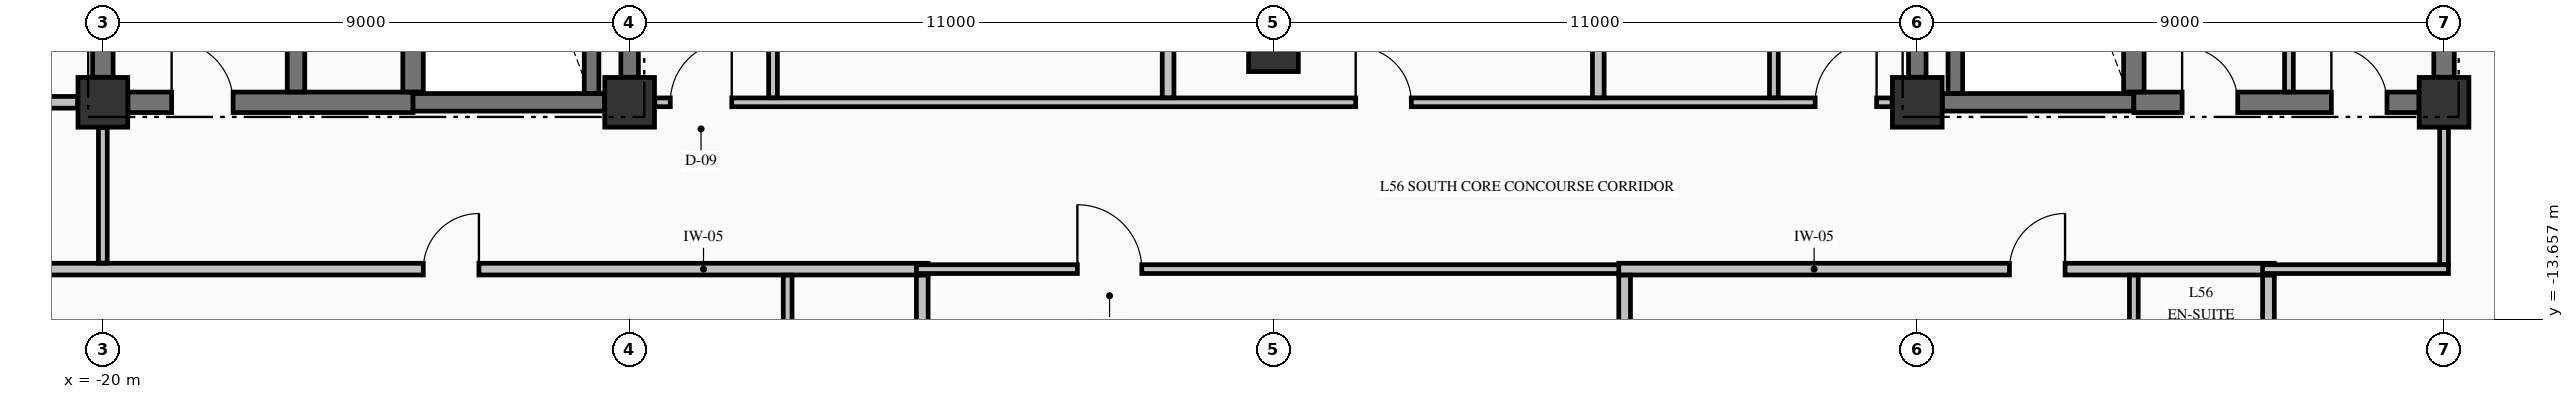
"""IFC4 building model, lengths in metres.
Left out: names, types, materials, properties, quantities, classifications, styles, units other than length and angle.
Written with IfcOpenShell. Run it as: python <this file> out.ifc"""

import sys

from ifc_helpers import new_model, si_unit, direction, frame, frame_2d, origin, origin_2d, place, context, subcontext, project, spatial, rectangle, extrude, element, fill, save


model = new_model("IFC4")
c1 = context("Model", 3, precision=1e-05, world=origin(), true_north=direction((0.0, 1.0)))
c2 = subcontext(c1, "Body", "Model", "MODEL_VIEW")
j1 = project(units=[si_unit("LENGTHUNIT", "METRE"), si_unit("PLANEANGLEUNIT", "RADIAN")], contexts=[c1])
p1 = place(None, origin())
s1 = spatial("IfcSite", under=j1, at=p1, CompositionType="ELEMENT")
p2 = place(p1, origin())
s2 = spatial("IfcBuilding", under=s1, at=p2, CompositionType="ELEMENT")
p3 = place(p2, frame((0.0, 0.0, 215.26)))
s3 = spatial("IfcBuildingStorey", under=s2, at=p3, CompositionType="ELEMENT", Elevation=215.26)
for number, where, z_axis, x_axis in (
    (1, (-20.0, -9.95, -0.25), (0.0, 0.0, 1.0), (1.0, 0.0, 0.0)),
    (2, (-11.0, -9.95, -0.25), (0.0, 0.0, 1.0), (1.0, 0.0, 0.0)),
    (3, (11.0, -9.95, -0.25), (0.0, 0.0, 1.0), (1.0, 0.0, 0.0)),
    (4, (20.0, -9.95, -0.25), (0.0, 0.0, 1.0), (1.0, 0.0, 0.0)),
    (5, (0.0, -9.0, -0.25), (0.0, 0.0, 1.0), (1.0, 0.0, 0.0)),
):
    element("IfcColumn", number, at=place(p3, frame(where, z_axis=z_axis, x_axis=x_axis)), inside=s3, PredefinedType="COLUMN", context=c2, shape_type="SweptSolid", body=[
        extrude(rectangle(XDim=0.85, YDim=0.85, at=origin_2d()), origin(), (0.0, 0.0, 1.0), 3.4),
    ])
p4 = place(p3, frame((-19.571, -9.95, 0.0), z_axis=(0.0, 0.0, 1.0), x_axis=(1.0, 0.0, 0.0)))
e6 = element("IfcWall", 6, at=p4, inside=s3, PredefinedType="SHEAR", context=c2, shape_type="SweptSolid", body=[
    extrude(rectangle(XDim=4.871, YDim=0.35, at=frame_2d((2.436, 0.0))), origin(), (0.0, 0.0, 1.0), 3.15),
])
p5 = place(p4, frame((0.746, 0.0, 0.0)))
e7 = element("IfcOpeningElement", 7, at=p5, cuts=e6, PredefinedType="OPENING", context=c2, shape_type="SweptSolid", body=[
    extrude(rectangle(XDim=1.05, YDim=2.15, at=frame_2d((0.525, 1.075))), frame((0.0, 0.185, 0.0), z_axis=(0.0, -1.0, 0.0), x_axis=(1.0, 0.0, 0.0)), (0.0, 0.0, 1.0), 0.37),
])
for number, where, z_axis, x_axis in (
    (8, (-14.7, -9.95, 0.0), (0.0, 0.0, 1.0), (1.0, 0.0, 0.0)),
    (9, (11.429, -9.95, 0.0), (0.0, 0.0, 1.0), (1.0, 0.0, 0.0)),
):
    element("IfcWall", number, at=place(p3, frame(where, z_axis=z_axis, x_axis=x_axis)), inside=s3, PredefinedType="SHEAR", context=c2, shape_type="SweptSolid", body=[
        extrude(rectangle(XDim=3.271, YDim=0.3, at=frame_2d((1.635, 0.0))), origin(), (0.0, 0.0, 1.0), 3.15),
    ])
p6 = place(p3, frame((14.7, -9.95, 0.0), z_axis=(0.0, 0.0, 1.0), x_axis=(1.0, 0.0, 0.0)))
e10 = element("IfcWall", 10, at=p6, inside=s3, PredefinedType="SHEAR", context=c2, shape_type="SweptSolid", body=[
    extrude(rectangle(XDim=4.871, YDim=0.35, at=frame_2d((2.436, 0.0))), origin(), (0.0, 0.0, 1.0), 3.15),
])
p7 = place(p6, frame((0.825, 0.0, 0.0)))
e11 = element("IfcOpeningElement", 11, at=p7, cuts=e10, PredefinedType="OPENING", context=c2, shape_type="SweptSolid", body=[
    extrude(rectangle(XDim=0.95, YDim=2.15, at=frame_2d((0.475, 1.075))), frame((0.0, 0.185, 0.0), z_axis=(0.0, -1.0, 0.0), x_axis=(1.0, 0.0, 0.0)), (0.0, 0.0, 1.0), 0.37),
])
p8 = place(p6, frame((3.375, 0.0, 0.0)))
e12 = element("IfcOpeningElement", 12, at=p8, cuts=e10, PredefinedType="OPENING", context=c2, shape_type="SweptSolid", body=[
    extrude(rectangle(XDim=0.95, YDim=2.15, at=frame_2d((0.475, 1.075))), frame((0.0, 0.185, 0.0), z_axis=(0.0, -1.0, 0.0), x_axis=(1.0, 0.0, 0.0)), (0.0, 0.0, 1.0), 0.37),
])
p9 = place(p3, frame((-22.1, -12.8, 0.0), z_axis=(0.0, 0.0, 1.0), x_axis=(1.0, 0.0, 0.0)))
e13 = element("IfcWall", 13, at=p9, inside=s3, PredefinedType="PARTITIONING", context=c2, shape_type="SweptSolid", body=[
    extrude(rectangle(XDim=16.2, YDim=0.2, at=frame_2d((8.1, 0.0))), origin(), (0.0, 0.0, 1.0), 3.15),
])
p10 = place(p9, frame((7.575, 0.0, 0.0)))
e14 = element("IfcOpeningElement", 14, at=p10, cuts=e13, PredefinedType="OPENING", context=c2, shape_type="SweptSolid", body=[
    extrude(rectangle(XDim=0.95, YDim=2.15, at=frame_2d((0.475, 1.075))), frame((0.0, 0.11, 0.0), z_axis=(0.0, -1.0, 0.0), x_axis=(1.0, 0.0, 0.0)), (0.0, 0.0, 1.0), 0.22),
])
p11 = place(p3, frame((-6.1, -12.8, 0.0), z_axis=(0.0, 0.0, 1.0), x_axis=(1.0, 0.0, 0.0)))
e15 = element("IfcWall", 15, at=p11, inside=s3, PredefinedType="PARTITIONING", context=c2, shape_type="SweptSolid", body=[
    extrude(rectangle(XDim=12.2, YDim=0.15, at=frame_2d((6.1, 0.0))), origin(), (0.0, 0.0, 1.0), 3.15),
])
p12 = place(p11, frame((2.75, 0.0, 0.0)))
e16 = element("IfcOpeningElement", 16, at=p12, cuts=e15, PredefinedType="OPENING", context=c2, shape_type="SweptSolid", body=[
    extrude(rectangle(XDim=1.1, YDim=2.15, at=frame_2d((0.55, 1.075))), frame((0.0, 0.085, 0.0), z_axis=(0.0, -1.0, 0.0), x_axis=(1.0, 0.0, 0.0)), (0.0, 0.0, 1.0), 0.17),
])
p13 = place(p3, frame((5.9, -12.8, 0.0), z_axis=(0.0, 0.0, 1.0), x_axis=(1.0, 0.0, 0.0)))
e17 = element("IfcWall", 17, at=p13, inside=s3, PredefinedType="PARTITIONING", context=c2, shape_type="SweptSolid", body=[
    extrude(rectangle(XDim=11.2, YDim=0.2, at=frame_2d((5.6, 0.0))), origin(), (0.0, 0.0, 1.0), 3.15),
])
p14 = place(p13, frame((6.675, 0.0, 0.0)))
e18 = element("IfcOpeningElement", 18, at=p14, cuts=e17, PredefinedType="OPENING", context=c2, shape_type="SweptSolid", body=[
    extrude(rectangle(XDim=0.95, YDim=2.15, at=frame_2d((0.475, 1.075))), frame((0.0, 0.11, 0.0), z_axis=(0.0, -1.0, 0.0), x_axis=(1.0, 0.0, 0.0)), (0.0, 0.0, 1.0), 0.22),
])
p15 = place(p3, frame((16.9, -12.8, 0.0), z_axis=(0.0, 0.0, 1.0), x_axis=(1.0, 0.0, 0.0)))
e19 = element("IfcWall", 19, at=p15, inside=s3, PredefinedType="PARTITIONING", context=c2, shape_type="SweptSolid", body=[
    extrude(rectangle(XDim=3.175, YDim=0.15, at=frame_2d((1.587, 0.0))), origin(), (0.0, 0.0, 1.0), 3.15),
])
p16 = place(p3, frame((-26.835, -9.95, 0.0), z_axis=(0.0, 0.0, 1.0), x_axis=(1.0, 0.0, 0.0)))
e20 = element("IfcWall", 20, at=p16, inside=s3, PredefinedType="PARTITIONING", context=c2, shape_type="SweptSolid", body=[
    extrude(rectangle(XDim=6.404, YDim=0.2, at=frame_2d((3.202, 0.0))), origin(), (0.0, 0.0, 1.0), 3.15),
])
p17 = place(p3, frame((-10.569, -9.95, 0.0), z_axis=(0.0, 0.0, 1.0), x_axis=(1.0, 0.0, 0.0)))
e21 = element("IfcWall", 21, at=p17, inside=s3, PredefinedType="PARTITIONING", context=c2, shape_type="SweptSolid", body=[
    extrude(rectangle(XDim=21.138, YDim=0.15, at=frame_2d((10.569, 0.0))), origin(), (0.0, 0.0, 1.0), 3.15),
])
p18 = place(p17, frame((0.264, 0.0, 0.0)))
e22 = element("IfcOpeningElement", 22, at=p18, cuts=e21, PredefinedType="OPENING", context=c2, shape_type="SweptSolid", body=[
    extrude(rectangle(XDim=1.05, YDim=2.15, at=frame_2d((0.525, 1.075))), frame((0.0, 0.085, 0.0), z_axis=(0.0, -1.0, 0.0), x_axis=(1.0, 0.0, 0.0)), (0.0, 0.0, 1.0), 0.17),
])
p19 = place(p17, frame((19.824, 0.0, 0.0)))
e23 = element("IfcOpeningElement", 23, at=p19, cuts=e21, PredefinedType="OPENING", context=c2, shape_type="SweptSolid", body=[
    extrude(rectangle(XDim=1.05, YDim=2.15, at=frame_2d((0.525, 1.075))), frame((0.0, 0.085, 0.0), z_axis=(0.0, -1.0, 0.0), x_axis=(1.0, 0.0, 0.0)), (0.0, 0.0, 1.0), 0.17),
])
p20 = place(p17, frame((11.974, 0.0, 0.0)))
e24 = element("IfcOpeningElement", 24, at=p20, cuts=e21, PredefinedType="OPENING", context=c2, shape_type="SweptSolid", body=[
    extrude(rectangle(XDim=0.95, YDim=2.15, at=frame_2d((0.475, 1.075))), frame((0.0, 0.085, 0.0), z_axis=(0.0, -1.0, 0.0), x_axis=(1.0, 0.0, 0.0)), (0.0, 0.0, 1.0), 0.17),
])
p21 = place(p3, frame((-20.0, -9.521, 0.0), z_axis=(0.0, 0.0, 1.0), x_axis=(0.0, 1.0, 0.0)))
e25 = element("IfcWall", 25, at=p21, inside=s3, PredefinedType="SHEAR", context=c2, shape_type="SweptSolid", body=[
    extrude(rectangle(XDim=9.092, YDim=0.35, at=frame_2d((4.546, 0.0))), origin(), (0.0, 0.0, 1.0), 3.15),
])
p22 = place(p3, frame((-16.7, -9.773, 0.0), z_axis=(0.0, 0.0, 1.0), x_axis=(0.0, 1.0, 0.0)))
e26 = element("IfcWall", 26, at=p22, inside=s3, PredefinedType="SHEAR", context=c2, shape_type="SweptSolid", body=[
    extrude(rectangle(XDim=9.371, YDim=0.3, at=frame_2d((4.686, 0.0))), origin(), (0.0, 0.0, 1.0), 3.15),
])
p23 = place(p3, frame((-14.7, -9.773, 0.0), z_axis=(0.0, 0.0, 1.0), x_axis=(0.0, 1.0, 0.0)))
e27 = element("IfcWall", 27, at=p23, inside=s3, PredefinedType="SHEAR", context=c2, shape_type="SweptSolid", body=[
    extrude(rectangle(XDim=9.371, YDim=0.35, at=frame_2d((4.686, 0.0))), origin(), (0.0, 0.0, 1.0), 3.15),
])
p24 = place(p3, frame((-11.65, -9.798, 0.0), z_axis=(0.0, 0.0, 1.0), x_axis=(0.0, 1.0, 0.0)))
e28 = element("IfcWall", 28, at=p24, inside=s3, PredefinedType="SOLIDWALL", context=c2, shape_type="SweptSolid", body=[
    extrude(rectangle(XDim=9.396, YDim=0.25, at=frame_2d((4.698, 0.0))), origin(), (0.0, 0.0, 1.0), 3.15),
])
for number, where, z_axis, x_axis in (
    (29, (-11.0, -9.521, 0.0), (0.0, 0.0, 1.0), (0.0, 1.0, 0.0)),
    (30, (11.0, -9.521, 0.0), (0.0, 0.0, 1.0), (0.0, 1.0, 0.0)),
):
    element("IfcWall", number, at=place(p3, frame(where, z_axis=z_axis, x_axis=x_axis)), inside=s3, PredefinedType="SHEAR", context=c2, shape_type="SweptSolid", body=[
        extrude(rectangle(XDim=9.092, YDim=0.3, at=frame_2d((4.546, 0.0))), origin(), (0.0, 0.0, 1.0), 3.15),
    ])
p25 = place(p3, frame((11.65, -9.798, 0.0), z_axis=(0.0, 0.0, 1.0), x_axis=(0.0, 1.0, 0.0)))
e31 = element("IfcWall", 31, at=p25, inside=s3, PredefinedType="SOLIDWALL", context=c2, shape_type="SweptSolid", body=[
    extrude(rectangle(XDim=9.396, YDim=0.25, at=frame_2d((4.698, 0.0))), origin(), (0.0, 0.0, 1.0), 3.15),
])
p26 = place(p3, frame((14.7, -9.773, 0.0), z_axis=(0.0, 0.0, 1.0), x_axis=(0.0, 1.0, 0.0)))
e32 = element("IfcWall", 32, at=p26, inside=s3, PredefinedType="SHEAR", context=c2, shape_type="SweptSolid", body=[
    extrude(rectangle(XDim=9.371, YDim=0.35, at=frame_2d((4.686, 0.0))), origin(), (0.0, 0.0, 1.0), 3.15),
])
p27 = place(p3, frame((20.0, -9.521, 0.0), z_axis=(0.0, 0.0, 1.0), x_axis=(0.0, 1.0, 0.0)))
e33 = element("IfcWall", 33, at=p27, inside=s3, PredefinedType="SHEAR", context=c2, shape_type="SweptSolid", body=[
    extrude(rectangle(XDim=9.092, YDim=0.35, at=frame_2d((4.546, 0.0))), origin(), (0.0, 0.0, 1.0), 3.15),
])
p28 = place(p3, frame((-20.0, -12.697, 0.0), z_axis=(0.0, 0.0, 1.0), x_axis=(0.0, 1.0, 0.0)))
e34 = element("IfcWall", 34, at=p28, inside=s3, PredefinedType="PARTITIONING", context=c2, shape_type="SweptSolid", body=[
    extrude(rectangle(XDim=2.316, YDim=0.15, at=frame_2d((1.158, 0.0))), origin(), (0.0, 0.0, 1.0), 2.342),
])
p29 = place(p3, frame((-8.55, -9.872, 0.0), z_axis=(0.0, 0.0, 1.0), x_axis=(0.0, 1.0, 0.0)))
e35 = element("IfcWall", 35, at=p29, inside=s3, PredefinedType="PARTITIONING", context=c2, shape_type="SweptSolid", body=[
    extrude(rectangle(XDim=10.569, YDim=0.15, at=frame_2d((5.285, 0.0))), origin(), (0.0, 0.0, 1.0), 3.15),
])
p30 = place(p29, frame((4.802, 0.0, 0.0)))
e36 = element("IfcOpeningElement", 36, at=p30, cuts=e35, PredefinedType="OPENING", context=c2, shape_type="SweptSolid", body=[
    extrude(rectangle(XDim=1.0, YDim=2.15, at=frame_2d((0.5, 1.075))), frame((0.0, 0.085, 0.0), z_axis=(0.0, -1.0, 0.0), x_axis=(1.0, 0.0, 0.0)), (0.0, 0.0, 1.0), 0.17),
])
p31 = place(p3, frame((-8.3, -14.972, 0.0), z_axis=(0.0, 0.0, 1.0), x_axis=(0.0, 1.0, 0.0)))
e37 = element("IfcWall", 37, at=p31, inside=s3, PredefinedType="PARTITIONING", context=c2, shape_type="SweptSolid", body=[
    extrude(rectangle(XDim=2.069, YDim=0.15, at=frame_2d((1.034, 0.0))), origin(), (0.0, 0.0, 1.0), 3.15),
])
p32 = place(p3, frame((-6.0, -14.972, 0.0), z_axis=(0.0, 0.0, 1.0), x_axis=(0.0, 1.0, 0.0)))
e38 = element("IfcWall", 38, at=p32, inside=s3, PredefinedType="PARTITIONING", context=c2, shape_type="SweptSolid", body=[
    extrude(rectangle(XDim=2.069, YDim=0.2, at=frame_2d((1.034, 0.0))), origin(), (0.0, 0.0, 1.0), 3.15),
])
for number, where, z_axis, x_axis in (
    (39, (-1.8, -9.872, 0.0), (0.0, 0.0, 1.0), (0.0, 1.0, 0.0)),
    (40, (5.55, -9.872, 0.0), (0.0, 0.0, 1.0), (0.0, 1.0, 0.0)),
):
    element("IfcWall", number, at=place(p3, frame(where, z_axis=z_axis, x_axis=x_axis)), inside=s3, PredefinedType="PARTITIONING", context=c2, shape_type="SweptSolid", body=[
        extrude(rectangle(XDim=4.569, YDim=0.2, at=frame_2d((2.285, 0.0))), origin(), (0.0, 0.0, 1.0), 3.15),
    ])
p33 = place(p3, frame((6.0, -16.472, 0.0), z_axis=(0.0, 0.0, 1.0), x_axis=(0.0, 1.0, 0.0)))
e41 = element("IfcWall", 41, at=p33, inside=s3, PredefinedType="PARTITIONING", context=c2, shape_type="SweptSolid", body=[
    extrude(rectangle(XDim=3.569, YDim=0.2, at=frame_2d((1.784, 0.0))), origin(), (0.0, 0.0, 1.0), 3.15),
])
p34 = place(p3, frame((8.55, -9.872, 0.0), z_axis=(0.0, 0.0, 1.0), x_axis=(0.0, 1.0, 0.0)))
e42 = element("IfcWall", 42, at=p34, inside=s3, PredefinedType="PARTITIONING", context=c2, shape_type="SweptSolid", body=[
    extrude(rectangle(XDim=4.569, YDim=0.15, at=frame_2d((2.285, 0.0))), origin(), (0.0, 0.0, 1.0), 3.15),
])
p35 = place(p34, frame((1.847, 0.0, 0.0)))
e43 = element("IfcOpeningElement", 43, at=p35, cuts=e42, PredefinedType="OPENING", context=c2, shape_type="SweptSolid", body=[
    extrude(rectangle(XDim=0.95, YDim=2.15, at=frame_2d((0.475, 1.075))), frame((0.0, 0.085, 0.0), z_axis=(0.0, -1.0, 0.0), x_axis=(1.0, 0.0, 0.0)), (0.0, 0.0, 1.0), 0.17),
])
p36 = place(p3, frame((14.7, -15.672, 0.0), z_axis=(0.0, 0.0, 1.0), x_axis=(0.0, 1.0, 0.0)))
e44 = element("IfcWall", 44, at=p36, inside=s3, PredefinedType="PARTITIONING", context=c2, shape_type="SweptSolid", body=[
    extrude(rectangle(XDim=2.769, YDim=0.15, at=frame_2d((1.385, 0.0))), origin(), (0.0, 0.0, 1.0), 3.15),
])
p37 = place(p3, frame((17.0, -15.672, 0.0), z_axis=(0.0, 0.0, 1.0), x_axis=(0.0, 1.0, 0.0)))
e45 = element("IfcWall", 45, at=p37, inside=s3, PredefinedType="PARTITIONING", context=c2, shape_type="SweptSolid", body=[
    extrude(rectangle(XDim=2.769, YDim=0.2, at=frame_2d((1.385, 0.0))), origin(), (0.0, 0.0, 1.0), 3.15),
])
p38 = place(p3, frame((17.35, -9.772, 0.0), z_axis=(0.0, 0.0, 1.0), x_axis=(0.0, 1.0, 0.0)))
e46 = element("IfcWall", 46, at=p38, inside=s3, PredefinedType="PARTITIONING", context=c2, shape_type="SweptSolid", body=[
    extrude(rectangle(XDim=7.194, YDim=0.15, at=frame_2d((3.597, 0.0))), origin(), (0.0, 0.0, 1.0), 3.15),
])
p39 = place(p3, frame((20.0, -12.722, 0.0), z_axis=(0.0, 0.0, 1.0), x_axis=(0.0, 1.0, 0.0)))
e47 = element("IfcWall", 47, at=p39, inside=s3, PredefinedType="PARTITIONING", context=c2, shape_type="SweptSolid", body=[
    extrude(rectangle(XDim=2.341, YDim=0.15, at=frame_2d((1.17, 0.0))), origin(), (0.0, 0.0, 1.0), 2.342),
])
p40 = place(p5, origin())
e48 = element("IfcDoor", 48, at=p40, inside=s3, OperationType="SINGLE_SWING_LEFT", PredefinedType="DOOR", context=c2, shape_type="SweptSolid", body=[
    extrude(rectangle(XDim=1.05, YDim=2.15, at=frame_2d((0.525, 1.075))), frame((0.0, 0.025, 0.0), z_axis=(0.0, -1.0, 0.0), x_axis=(1.0, 0.0, 0.0)), (0.0, 0.0, 1.0), 0.05),
])
fill(e7, e48)
p41 = place(p7, origin())
e49 = element("IfcDoor", 49, at=p41, inside=s3, OperationType="SINGLE_SWING_LEFT", PredefinedType="DOOR", context=c2, shape_type="SweptSolid", body=[
    extrude(rectangle(XDim=0.95, YDim=2.15, at=frame_2d((0.475, 1.075))), frame((0.0, 0.025, 0.0), z_axis=(0.0, -1.0, 0.0), x_axis=(1.0, 0.0, 0.0)), (0.0, 0.0, 1.0), 0.05),
])
fill(e11, e49)
p42 = place(p8, origin())
e50 = element("IfcDoor", 50, at=p42, inside=s3, OperationType="SINGLE_SWING_LEFT", PredefinedType="DOOR", context=c2, shape_type="SweptSolid", body=[
    extrude(rectangle(XDim=0.95, YDim=2.15, at=frame_2d((0.475, 1.075))), frame((0.0, 0.025, 0.0), z_axis=(0.0, -1.0, 0.0), x_axis=(1.0, 0.0, 0.0)), (0.0, 0.0, 1.0), 0.05),
])
fill(e12, e50)
p43 = place(p18, origin())
e51 = element("IfcDoor", 51, at=p43, inside=s3, OperationType="SINGLE_SWING_RIGHT", PredefinedType="DOOR", context=c2, shape_type="SweptSolid", body=[
    extrude(rectangle(XDim=1.05, YDim=2.15, at=frame_2d((0.525, 1.075))), frame((0.0, 0.025, 0.0), z_axis=(0.0, -1.0, 0.0), x_axis=(1.0, 0.0, 0.0)), (0.0, 0.0, 1.0), 0.05),
])
fill(e22, e51)
p44 = place(p19, origin())
e52 = element("IfcDoor", 52, at=p44, inside=s3, OperationType="SINGLE_SWING_RIGHT", PredefinedType="DOOR", context=c2, shape_type="SweptSolid", body=[
    extrude(rectangle(XDim=1.05, YDim=2.15, at=frame_2d((0.525, 1.075))), frame((0.0, 0.025, 0.0), z_axis=(0.0, -1.0, 0.0), x_axis=(1.0, 0.0, 0.0)), (0.0, 0.0, 1.0), 0.05),
])
fill(e23, e52)
p45 = place(p12, origin())
e53 = element("IfcDoor", 53, at=p45, inside=s3, OperationType="SINGLE_SWING_LEFT", PredefinedType="DOOR", context=c2, shape_type="SweptSolid", body=[
    extrude(rectangle(XDim=1.1, YDim=2.15, at=frame_2d((0.55, 1.075))), frame((0.0, 0.025, 0.0), z_axis=(0.0, -1.0, 0.0), x_axis=(1.0, 0.0, 0.0)), (0.0, 0.0, 1.0), 0.05),
])
fill(e16, e53)
p46 = place(p10, origin())
e54 = element("IfcDoor", 54, at=p46, inside=s3, OperationType="SINGLE_SWING_RIGHT", PredefinedType="DOOR", context=c2, shape_type="SweptSolid", body=[
    extrude(rectangle(XDim=0.95, YDim=2.15, at=frame_2d((0.475, 1.075))), frame((0.0, 0.025, 0.0), z_axis=(0.0, -1.0, 0.0), x_axis=(1.0, 0.0, 0.0)), (0.0, 0.0, 1.0), 0.05),
])
fill(e14, e54)
p47 = place(p14, origin())
e55 = element("IfcDoor", 55, at=p47, inside=s3, OperationType="SINGLE_SWING_RIGHT", PredefinedType="DOOR", context=c2, shape_type="SweptSolid", body=[
    extrude(rectangle(XDim=0.95, YDim=2.15, at=frame_2d((0.475, 1.075))), frame((0.0, 0.025, 0.0), z_axis=(0.0, -1.0, 0.0), x_axis=(1.0, 0.0, 0.0)), (0.0, 0.0, 1.0), 0.05),
])
fill(e18, e55)
p48 = place(p20, origin())
e56 = element("IfcDoor", 56, at=p48, inside=s3, OperationType="SINGLE_SWING_LEFT", PredefinedType="DOOR", context=c2, shape_type="SweptSolid", body=[
    extrude(rectangle(XDim=0.95, YDim=2.15, at=frame_2d((0.475, 1.075))), frame((0.0, 0.025, 0.0), z_axis=(0.0, -1.0, 0.0), x_axis=(1.0, 0.0, 0.0)), (0.0, 0.0, 1.0), 0.05),
])
fill(e24, e56)
save(model, sys.argv[1])
